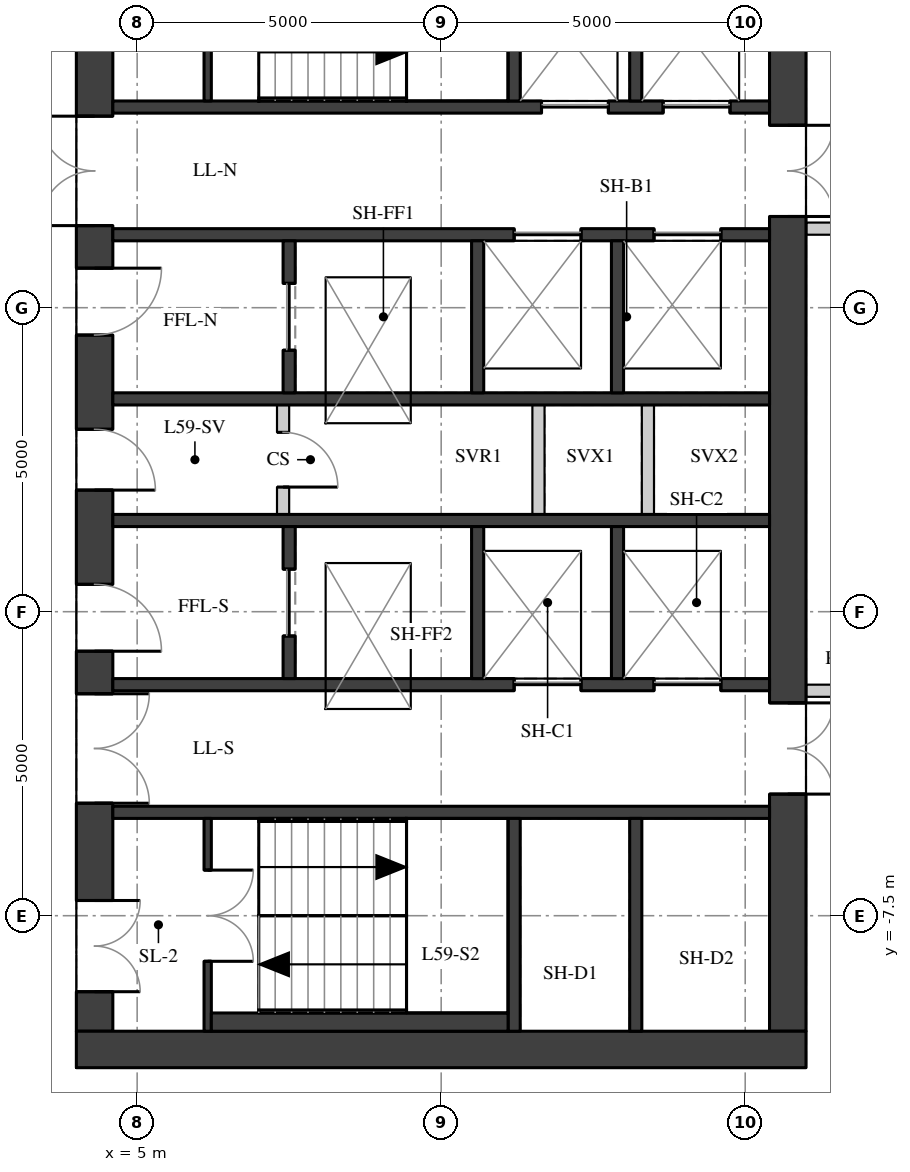
"""IFC4 building model, lengths in metres.
Left out: names, types, materials, properties, quantities, classifications, styles, units other than length and angle.
Written with IfcOpenShell. Run it as: python <this file> out.ifc"""

import sys

from ifc_helpers import new_model, si_unit, direction, frame, frame_2d, origin, place, context, subcontext, project, spatial, rectangle, extrude, element, fill, save


model = new_model("IFC4")
c1 = context("Model", 3, precision=1e-05, world=origin(), true_north=direction((0.0, 1.0)))
c2 = subcontext(c1, "Body", "Model", "MODEL_VIEW")
j1 = project(units=[si_unit("LENGTHUNIT", "METRE"), si_unit("PLANEANGLEUNIT", "RADIAN")], contexts=[c1])
p1 = place(None, origin())
s1 = spatial("IfcSite", under=j1, at=p1, CompositionType="ELEMENT")
p2 = place(p1, origin())
s2 = spatial("IfcBuilding", under=s1, at=p2, CompositionType="ELEMENT")
p3 = place(p2, frame((0.0, 0.0, 209.0)))
s3 = spatial("IfcBuildingStorey", under=s2, at=p3, CompositionType="ELEMENT", Elevation=209.0)
p4 = place(p3, frame((4.3, -9.4, 0.0), z_axis=(0.0, 0.0, 1.0), x_axis=(0.0, 1.0, 0.0)))
e1 = element("IfcWall", 1, at=p4, inside=s3, PredefinedType="SHEAR", context=c2, shape_type="SweptSolid", body=[
    extrude(rectangle(XDim=18.8, YDim=0.6, at=frame_2d((9.4, 0.0))), origin(), (0.0, 0.0, 1.0), 3.02),
])
p5 = place(p4, frame((0.65, 0.0, 0.0)))
e2 = element("IfcOpeningElement", 2, at=p5, cuts=e1, PredefinedType="OPENING", context=c2, shape_type="SweptSolid", body=[
    extrude(rectangle(XDim=1.5, YDim=2.1, at=frame_2d((0.75, 1.05))), frame((0.0, 0.31, 0.0), z_axis=(0.0, -1.0, 0.0), x_axis=(1.0, 0.0, 0.0)), (0.0, 0.0, 1.0), 0.62),
])
p6 = place(p4, frame((3.75, 0.0, 0.0)))
e3 = element("IfcOpeningElement", 3, at=p6, cuts=e1, PredefinedType="OPENING", context=c2, shape_type="SweptSolid", body=[
    extrude(rectangle(XDim=1.8, YDim=2.1, at=frame_2d((0.9, 1.05))), frame((0.0, 0.31, 0.0), z_axis=(0.0, -1.0, 0.0), x_axis=(1.0, 0.0, 0.0)), (0.0, 0.0, 1.0), 0.62),
])
p7 = place(p4, frame((6.25, 0.0, 0.0)))
e4 = element("IfcOpeningElement", 4, at=p7, cuts=e1, PredefinedType="OPENING", context=c2, shape_type="SweptSolid", body=[
    extrude(rectangle(XDim=1.1, YDim=2.1, at=frame_2d((0.55, 1.05))), frame((0.0, 0.31, 0.0), z_axis=(0.0, -1.0, 0.0), x_axis=(1.0, 0.0, 0.0)), (0.0, 0.0, 1.0), 0.62),
])
p8 = place(p4, frame((8.9, 0.0, 0.0)))
e5 = element("IfcOpeningElement", 5, at=p8, cuts=e1, PredefinedType="OPENING", context=c2, shape_type="SweptSolid", body=[
    extrude(rectangle(XDim=1.0, YDim=2.1, at=frame_2d((0.5, 1.05))), frame((0.0, 0.31, 0.0), z_axis=(0.0, -1.0, 0.0), x_axis=(1.0, 0.0, 0.0)), (0.0, 0.0, 1.0), 0.62),
])
p9 = place(p4, frame((11.45, 0.0, 0.0)))
e6 = element("IfcOpeningElement", 6, at=p9, cuts=e1, PredefinedType="OPENING", context=c2, shape_type="SweptSolid", body=[
    extrude(rectangle(XDim=1.1, YDim=2.1, at=frame_2d((0.55, 1.05))), frame((0.0, 0.31, 0.0), z_axis=(0.0, -1.0, 0.0), x_axis=(1.0, 0.0, 0.0)), (0.0, 0.0, 1.0), 0.62),
])
p10 = place(p4, frame((13.25, 0.0, 0.0)))
e7 = element("IfcOpeningElement", 7, at=p10, cuts=e1, PredefinedType="OPENING", context=c2, shape_type="SweptSolid", body=[
    extrude(rectangle(XDim=1.8, YDim=2.1, at=frame_2d((0.9, 1.05))), frame((0.0, 0.31, 0.0), z_axis=(0.0, -1.0, 0.0), x_axis=(1.0, 0.0, 0.0)), (0.0, 0.0, 1.0), 0.62),
])
p11 = place(p4, frame((16.65, 0.0, 0.0)))
e8 = element("IfcOpeningElement", 8, at=p11, cuts=e1, PredefinedType="OPENING", context=c2, shape_type="SweptSolid", body=[
    extrude(rectangle(XDim=1.5, YDim=2.1, at=frame_2d((0.75, 1.05))), frame((0.0, 0.31, 0.0), z_axis=(0.0, -1.0, 0.0), x_axis=(1.0, 0.0, 0.0)), (0.0, 0.0, 1.0), 0.62),
])
p12 = place(p3, frame((15.7, -9.4, 0.0), z_axis=(0.0, 0.0, 1.0), x_axis=(0.0, 1.0, 0.0)))
e9 = element("IfcWall", 9, at=p12, inside=s3, PredefinedType="SHEAR", context=c2, shape_type="SweptSolid", body=[
    extrude(rectangle(XDim=18.8, YDim=0.6, at=frame_2d((9.4, 0.0))), origin(), (0.0, 0.0, 1.0), 3.02),
])
p13 = place(p12, frame((13.4, 0.0, 0.0)))
e10 = element("IfcOpeningElement", 10, at=p13, cuts=e9, PredefinedType="OPENING", context=c2, shape_type="SweptSolid", body=[
    extrude(rectangle(XDim=1.5, YDim=2.1, at=frame_2d((0.75, 1.05))), frame((0.0, 0.31, 0.0), z_axis=(0.0, -1.0, 0.0), x_axis=(1.0, 0.0, 0.0)), (0.0, 0.0, 1.0), 0.62),
])
p14 = place(p12, frame((3.9, 0.0, 0.0)))
e11 = element("IfcOpeningElement", 11, at=p14, cuts=e9, PredefinedType="OPENING", context=c2, shape_type="SweptSolid", body=[
    extrude(rectangle(XDim=1.5, YDim=2.1, at=frame_2d((0.75, 1.05))), frame((0.0, 0.31, 0.0), z_axis=(0.0, -1.0, 0.0), x_axis=(1.0, 0.0, 0.0)), (0.0, 0.0, 1.0), 0.62),
])
p15 = place(p3, frame((4.0, -9.7, 0.0), z_axis=(0.0, 0.0, 1.0), x_axis=(1.0, 0.0, 0.0)))
e12 = element("IfcWall", 12, at=p15, inside=s3, PredefinedType="SHEAR", context=c2, shape_type="SweptSolid", body=[
    extrude(rectangle(XDim=12.0, YDim=0.6, at=frame_2d((6.0, 0.0))), origin(), (0.0, 0.0, 1.0), 3.02),
])
p16 = place(p3, frame((4.6, 5.8, 0.0), z_axis=(0.0, 0.0, 1.0), x_axis=(1.0, 0.0, 0.0)))
e13 = element("IfcWall", 13, at=p16, inside=s3, PredefinedType="SHEAR", context=c2, shape_type="SweptSolid", body=[
    extrude(rectangle(XDim=10.8, YDim=0.2, at=frame_2d((5.4, 0.0))), origin(), (0.0, 0.0, 1.0), 3.02),
])
p17 = place(p16, frame((7.05, 0.0, 0.0)))
e14 = element("IfcOpeningElement", 14, at=p17, cuts=e13, PredefinedType="OPENING", context=c2, shape_type="SweptSolid", body=[
    extrude(rectangle(XDim=1.1, YDim=2.1, at=frame_2d((0.55, 1.05))), frame((0.0, 0.11, 0.0), z_axis=(0.0, -1.0, 0.0), x_axis=(1.0, 0.0, 0.0)), (0.0, 0.0, 1.0), 0.22),
])
p18 = place(p16, frame((9.05, 0.0, 0.0)))
e15 = element("IfcOpeningElement", 15, at=p18, cuts=e13, PredefinedType="OPENING", context=c2, shape_type="SweptSolid", body=[
    extrude(rectangle(XDim=1.1, YDim=2.1, at=frame_2d((0.55, 1.05))), frame((0.0, 0.11, 0.0), z_axis=(0.0, -1.0, 0.0), x_axis=(1.0, 0.0, 0.0)), (0.0, 0.0, 1.0), 0.22),
])
p19 = place(p3, frame((4.6, 3.7, 0.0), z_axis=(0.0, 0.0, 1.0), x_axis=(1.0, 0.0, 0.0)))
e16 = element("IfcWall", 16, at=p19, inside=s3, PredefinedType="SHEAR", context=c2, shape_type="SweptSolid", body=[
    extrude(rectangle(XDim=10.8, YDim=0.2, at=frame_2d((5.4, 0.0))), origin(), (0.0, 0.0, 1.0), 3.02),
])
p20 = place(p19, frame((6.6, 0.0, 0.0)))
e17 = element("IfcOpeningElement", 17, at=p20, cuts=e16, PredefinedType="OPENING", context=c2, shape_type="SweptSolid", body=[
    extrude(rectangle(XDim=1.1, YDim=2.1, at=frame_2d((0.55, 1.05))), frame((0.0, 0.11, 0.0), z_axis=(0.0, -1.0, 0.0), x_axis=(1.0, 0.0, 0.0)), (0.0, 0.0, 1.0), 0.22),
])
p21 = place(p19, frame((8.9, 0.0, 0.0)))
e18 = element("IfcOpeningElement", 18, at=p21, cuts=e16, PredefinedType="OPENING", context=c2, shape_type="SweptSolid", body=[
    extrude(rectangle(XDim=1.1, YDim=2.1, at=frame_2d((0.55, 1.05))), frame((0.0, 0.11, 0.0), z_axis=(0.0, -1.0, 0.0), x_axis=(1.0, 0.0, 0.0)), (0.0, 0.0, 1.0), 0.22),
])
for number, where, z_axis, x_axis in (
    (19, (4.6, 1.0, 0.0), (0.0, 0.0, 1.0), (1.0, 0.0, 0.0)),
    (20, (4.6, -1.0, 0.0), (0.0, 0.0, 1.0), (1.0, 0.0, 0.0)),
):
    element("IfcWall", number, at=place(p3, frame(where, z_axis=z_axis, x_axis=x_axis)), inside=s3, PredefinedType="SHEAR", context=c2, shape_type="SweptSolid", body=[
        extrude(rectangle(XDim=10.8, YDim=0.2, at=frame_2d((5.4, 0.0))), origin(), (0.0, 0.0, 1.0), 3.02),
    ])
p22 = place(p3, frame((4.6, -3.7, 0.0), z_axis=(0.0, 0.0, 1.0), x_axis=(1.0, 0.0, 0.0)))
e21 = element("IfcWall", 21, at=p22, inside=s3, PredefinedType="SHEAR", context=c2, shape_type="SweptSolid", body=[
    extrude(rectangle(XDim=10.8, YDim=0.2, at=frame_2d((5.4, 0.0))), origin(), (0.0, 0.0, 1.0), 3.02),
])
p23 = place(p22, frame((6.6, 0.0, 0.0)))
e22 = element("IfcOpeningElement", 22, at=p23, cuts=e21, PredefinedType="OPENING", context=c2, shape_type="SweptSolid", body=[
    extrude(rectangle(XDim=1.1, YDim=2.1, at=frame_2d((0.55, 1.05))), frame((0.0, 0.11, 0.0), z_axis=(0.0, -1.0, 0.0), x_axis=(1.0, 0.0, 0.0)), (0.0, 0.0, 1.0), 0.22),
])
p24 = place(p22, frame((8.9, 0.0, 0.0)))
e23 = element("IfcOpeningElement", 23, at=p24, cuts=e21, PredefinedType="OPENING", context=c2, shape_type="SweptSolid", body=[
    extrude(rectangle(XDim=1.1, YDim=2.1, at=frame_2d((0.55, 1.05))), frame((0.0, 0.11, 0.0), z_axis=(0.0, -1.0, 0.0), x_axis=(1.0, 0.0, 0.0)), (0.0, 0.0, 1.0), 0.22),
])
p25 = place(p3, frame((4.6, -5.8, 0.0), z_axis=(0.0, 0.0, 1.0), x_axis=(1.0, 0.0, 0.0)))
e24 = element("IfcWall", 24, at=p25, inside=s3, PredefinedType="SHEAR", context=c2, shape_type="SweptSolid", body=[
    extrude(rectangle(XDim=10.8, YDim=0.2, at=frame_2d((5.4, 0.0))), origin(), (0.0, 0.0, 1.0), 3.02),
])
for number, where, z_axis, x_axis in (
    (25, (11.2, 5.9, 0.0), (0.0, 0.0, 1.0), (0.0, 1.0, 0.0)),
    (26, (11.2, -9.4, 0.0), (0.0, 0.0, 1.0), (0.0, 1.0, 0.0)),
    (27, (13.2, 5.9, 0.0), (0.0, 0.0, 1.0), (0.0, 1.0, 0.0)),
    (28, (13.2, -9.4, 0.0), (0.0, 0.0, 1.0), (0.0, 1.0, 0.0)),
):
    element("IfcWall", number, at=place(p3, frame(where, z_axis=z_axis, x_axis=x_axis)), inside=s3, PredefinedType="SHEAR", context=c2, shape_type="SweptSolid", body=[
        extrude(rectangle(XDim=3.5, YDim=0.2, at=frame_2d((1.75, 0.0))), origin(), (0.0, 0.0, 1.0), 3.02),
    ])
p26 = place(p3, frame((7.5, 1.1, 0.0), z_axis=(0.0, 0.0, 1.0), x_axis=(0.0, 1.0, 0.0)))
e29 = element("IfcWall", 29, at=p26, inside=s3, PredefinedType="SHEAR", context=c2, shape_type="SweptSolid", body=[
    extrude(rectangle(XDim=2.5, YDim=0.2, at=frame_2d((1.25, 0.0))), origin(), (0.0, 0.0, 1.0), 3.02),
])
p27 = place(p26, frame((0.7, 0.0, 0.0)))
e30 = element("IfcOpeningElement", 30, at=p27, cuts=e29, PredefinedType="OPENING", context=c2, shape_type="SweptSolid", body=[
    extrude(rectangle(XDim=1.1, YDim=2.1, at=frame_2d((0.55, 1.05))), frame((0.0, 0.11, 0.0), z_axis=(0.0, -1.0, 0.0), x_axis=(1.0, 0.0, 0.0)), (0.0, 0.0, 1.0), 0.22),
])
p28 = place(p3, frame((7.5, -3.6, 0.0), z_axis=(0.0, 0.0, 1.0), x_axis=(0.0, 1.0, 0.0)))
e31 = element("IfcWall", 31, at=p28, inside=s3, PredefinedType="SHEAR", context=c2, shape_type="SweptSolid", body=[
    extrude(rectangle(XDim=2.5, YDim=0.2, at=frame_2d((1.25, 0.0))), origin(), (0.0, 0.0, 1.0), 3.02),
])
p29 = place(p28, frame((0.7, 0.0, 0.0)))
e32 = element("IfcOpeningElement", 32, at=p29, cuts=e31, PredefinedType="OPENING", context=c2, shape_type="SweptSolid", body=[
    extrude(rectangle(XDim=1.1, YDim=2.1, at=frame_2d((0.55, 1.05))), frame((0.0, 0.11, 0.0), z_axis=(0.0, -1.0, 0.0), x_axis=(1.0, 0.0, 0.0)), (0.0, 0.0, 1.0), 0.22),
])
for number, where, z_axis, x_axis in (
    (33, (10.6, 1.1, 0.0), (0.0, 0.0, 1.0), (0.0, 1.0, 0.0)),
    (34, (10.6, -3.6, 0.0), (0.0, 0.0, 1.0), (0.0, 1.0, 0.0)),
    (35, (12.9, 1.1, 0.0), (0.0, 0.0, 1.0), (0.0, 1.0, 0.0)),
    (36, (12.9, -3.6, 0.0), (0.0, 0.0, 1.0), (0.0, 1.0, 0.0)),
):
    element("IfcWall", number, at=place(p3, frame(where, z_axis=z_axis, x_axis=x_axis)), inside=s3, PredefinedType="SHEAR", context=c2, shape_type="SweptSolid", body=[
        extrude(rectangle(XDim=2.5, YDim=0.2, at=frame_2d((1.25, 0.0))), origin(), (0.0, 0.0, 1.0), 3.02),
    ])
p30 = place(p3, frame((6.16, 5.9, 0.0), z_axis=(0.0, 0.0, 1.0), x_axis=(0.0, 1.0, 0.0)))
e37 = element("IfcWall", 37, at=p30, inside=s3, PredefinedType="SHEAR", context=c2, shape_type="SweptSolid", body=[
    extrude(rectangle(XDim=3.5, YDim=0.12, at=frame_2d((1.75, 0.0))), origin(), (0.0, 0.0, 1.0), 3.02),
])
p31 = place(p30, frame((0.85, 0.0, 0.0)))
e38 = element("IfcOpeningElement", 38, at=p31, cuts=e37, PredefinedType="OPENING", context=c2, shape_type="SweptSolid", body=[
    extrude(rectangle(XDim=1.5, YDim=2.1, at=frame_2d((0.75, 1.05))), frame((0.0, 0.07, 0.0), z_axis=(0.0, -1.0, 0.0), x_axis=(1.0, 0.0, 0.0)), (0.0, 0.0, 1.0), 0.14),
])
p32 = place(p3, frame((6.16, -9.4, 0.0), z_axis=(0.0, 0.0, 1.0), x_axis=(0.0, 1.0, 0.0)))
e39 = element("IfcWall", 39, at=p32, inside=s3, PredefinedType="SHEAR", context=c2, shape_type="SweptSolid", body=[
    extrude(rectangle(XDim=3.5, YDim=0.12, at=frame_2d((1.75, 0.0))), origin(), (0.0, 0.0, 1.0), 3.02),
])
p33 = place(p32, frame((1.15, 0.0, 0.0)))
e40 = element("IfcOpeningElement", 40, at=p33, cuts=e39, PredefinedType="OPENING", context=c2, shape_type="SweptSolid", body=[
    extrude(rectangle(XDim=1.5, YDim=2.1, at=frame_2d((0.75, 1.05))), frame((0.0, 0.07, 0.0), z_axis=(0.0, -1.0, 0.0), x_axis=(1.0, 0.0, 0.0)), (0.0, 0.0, 1.0), 0.14),
])
p34 = place(p3, frame((7.4, -0.9, 0.0), z_axis=(0.0, 0.0, 1.0), x_axis=(0.0, 1.0, 0.0)))
e41 = element("IfcWall", 41, at=p34, inside=s3, PredefinedType="PARTITIONING", context=c2, shape_type="SweptSolid", body=[
    extrude(rectangle(XDim=1.8, YDim=0.2, at=frame_2d((0.9, 0.0))), origin(), (0.0, 0.0, 1.0), 3.02),
])
p35 = place(p34, frame((0.45, 0.0, 0.0)))
e42 = element("IfcOpeningElement", 42, at=p35, cuts=e41, PredefinedType="OPENING", context=c2, shape_type="SweptSolid", body=[
    extrude(rectangle(XDim=0.9, YDim=2.1, at=frame_2d((0.45, 1.05))), frame((0.0, 0.11, 0.0), z_axis=(0.0, -1.0, 0.0), x_axis=(1.0, 0.0, 0.0)), (0.0, 0.0, 1.0), 0.22),
])
for number, where, z_axis, x_axis in (
    (43, (11.6, -0.9, 0.0), (0.0, 0.0, 1.0), (0.0, 1.0, 0.0)),
    (44, (13.4, -0.9, 0.0), (0.0, 0.0, 1.0), (0.0, 1.0, 0.0)),
):
    element("IfcWall", number, at=place(p3, frame(where, z_axis=z_axis, x_axis=x_axis)), inside=s3, PredefinedType="PARTITIONING", context=c2, shape_type="SweptSolid", body=[
        extrude(rectangle(XDim=1.8, YDim=0.2, at=frame_2d((0.9, 0.0))), origin(), (0.0, 0.0, 1.0), 3.02),
    ])
p36 = place(p3, frame((6.22, -9.25, 0.0), z_axis=(0.0, 0.0, 1.0), x_axis=(1.0, 0.0, 0.0)))
e45 = element("IfcWall", 45, at=p36, inside=s3, PredefinedType="PARTITIONING", context=c2, shape_type="SweptSolid", body=[
    extrude(rectangle(XDim=4.88, YDim=0.3, at=frame_2d((2.44, 0.0))), origin(), (0.0, 0.0, 1.0), 3.02),
])
p37 = place(p3, frame((17.5, 3.8, 0.0), z_axis=(0.0, 0.0, 1.0), x_axis=(-1.0, 0.0, 0.0)))
e46 = element("IfcWall", 46, at=p37, inside=s3, PredefinedType="PARTITIONING", context=c2, shape_type="SweptSolid", body=[
    extrude(rectangle(XDim=1.496, YDim=0.2, at=frame_2d((0.748, 0.0))), origin(), (0.0, 0.0, 1.0), 3.02),
])
p38 = place(p3, frame((16.004, -3.8, 0.0), z_axis=(0.0, 0.0, 1.0), x_axis=(1.0, 0.0, 0.0)))
e47 = element("IfcWall", 47, at=p38, inside=s3, PredefinedType="PARTITIONING", context=c2, shape_type="SweptSolid", body=[
    extrude(rectangle(XDim=1.496, YDim=0.2, at=frame_2d((0.748, 0.0))), origin(), (0.0, 0.0, 1.0), 2.47),
])
p39 = place(p5, origin())
e48 = element("IfcDoor", 48, at=p39, inside=s3, OperationType="DOUBLE_DOOR_SINGLE_SWING", PredefinedType="DOOR", context=c2, shape_type="SweptSolid", body=[
    extrude(rectangle(XDim=1.5, YDim=2.1, at=frame_2d((0.75, 1.05))), frame((0.0, 0.025, 0.0), z_axis=(0.0, -1.0, 0.0), x_axis=(1.0, 0.0, 0.0)), (0.0, 0.0, 1.0), 0.05),
])
fill(e2, e48)
p40 = place(p6, origin())
e49 = element("IfcDoor", 49, at=p40, inside=s3, OperationType="DOUBLE_DOOR_SINGLE_SWING", PredefinedType="DOOR", context=c2, shape_type="SweptSolid", body=[
    extrude(rectangle(XDim=1.8, YDim=2.1, at=frame_2d((0.9, 1.05))), frame((0.0, 0.025, 0.0), z_axis=(0.0, -1.0, 0.0), x_axis=(1.0, 0.0, 0.0)), (0.0, 0.0, 1.0), 0.05),
])
fill(e3, e49)
p41 = place(p7, origin())
e50 = element("IfcDoor", 50, at=p41, inside=s3, OperationType="SINGLE_SWING_RIGHT", PredefinedType="DOOR", context=c2, shape_type="SweptSolid", body=[
    extrude(rectangle(XDim=1.1, YDim=2.1, at=frame_2d((0.55, 1.05))), frame((0.0, 0.025, 0.0), z_axis=(0.0, -1.0, 0.0), x_axis=(1.0, 0.0, 0.0)), (0.0, 0.0, 1.0), 0.05),
])
fill(e4, e50)
p42 = place(p8, origin())
e51 = element("IfcDoor", 51, at=p42, inside=s3, OperationType="SINGLE_SWING_RIGHT", PredefinedType="DOOR", context=c2, shape_type="SweptSolid", body=[
    extrude(rectangle(XDim=1.0, YDim=2.1, at=frame_2d((0.5, 1.05))), frame((0.0, 0.025, 0.0), z_axis=(0.0, -1.0, 0.0), x_axis=(1.0, 0.0, 0.0)), (0.0, 0.0, 1.0), 0.05),
])
fill(e5, e51)
p43 = place(p9, origin())
e52 = element("IfcDoor", 52, at=p43, inside=s3, OperationType="SINGLE_SWING_LEFT", PredefinedType="DOOR", context=c2, shape_type="SweptSolid", body=[
    extrude(rectangle(XDim=1.1, YDim=2.1, at=frame_2d((0.55, 1.05))), frame((0.0, 0.025, 0.0), z_axis=(0.0, -1.0, 0.0), x_axis=(1.0, 0.0, 0.0)), (0.0, 0.0, 1.0), 0.05),
])
fill(e6, e52)
p44 = place(p10, origin())
e53 = element("IfcDoor", 53, at=p44, inside=s3, OperationType="DOUBLE_DOOR_SINGLE_SWING", PredefinedType="DOOR", context=c2, shape_type="SweptSolid", body=[
    extrude(rectangle(XDim=1.8, YDim=2.1, at=frame_2d((0.9, 1.05))), frame((0.0, 0.025, 0.0), z_axis=(0.0, -1.0, 0.0), x_axis=(1.0, 0.0, 0.0)), (0.0, 0.0, 1.0), 0.05),
])
fill(e7, e53)
p45 = place(p13, origin())
e54 = element("IfcDoor", 54, at=p45, inside=s3, OperationType="DOUBLE_DOOR_SINGLE_SWING", PredefinedType="DOOR", context=c2, shape_type="SweptSolid", body=[
    extrude(rectangle(XDim=1.5, YDim=2.1, at=frame_2d((0.75, 1.05))), frame((0.0, 0.025, 0.0), z_axis=(0.0, -1.0, 0.0), x_axis=(1.0, 0.0, 0.0)), (0.0, 0.0, 1.0), 0.05),
])
fill(e10, e54)
p46 = place(p14, origin())
e55 = element("IfcDoor", 55, at=p46, inside=s3, OperationType="DOUBLE_DOOR_SINGLE_SWING", PredefinedType="DOOR", context=c2, shape_type="SweptSolid", body=[
    extrude(rectangle(XDim=1.5, YDim=2.1, at=frame_2d((0.75, 1.05))), frame((0.0, 0.025, 0.0), z_axis=(0.0, -1.0, 0.0), x_axis=(1.0, 0.0, 0.0)), (0.0, 0.0, 1.0), 0.05),
])
fill(e11, e55)
p47 = place(p33, origin())
e56 = element("IfcDoor", 56, at=p47, inside=s3, OperationType="DOUBLE_DOOR_SINGLE_SWING", PredefinedType="DOOR", context=c2, shape_type="SweptSolid", body=[
    extrude(rectangle(XDim=1.5, YDim=2.1, at=frame_2d((0.75, 1.05))), frame((0.0, 0.025, 0.0), z_axis=(0.0, -1.0, 0.0), x_axis=(1.0, 0.0, 0.0)), (0.0, 0.0, 1.0), 0.05),
])
fill(e40, e56)
p48 = place(p17, origin())
e57 = element("IfcDoor", 57, at=p48, inside=s3, OperationType="DOUBLE_DOOR_SLIDING", PredefinedType="DOOR", context=c2, shape_type="SweptSolid", body=[
    extrude(rectangle(XDim=1.1, YDim=2.1, at=frame_2d((0.55, 1.05))), frame((0.0, 0.025, 0.0), z_axis=(0.0, -1.0, 0.0), x_axis=(1.0, 0.0, 0.0)), (0.0, 0.0, 1.0), 0.05),
])
fill(e14, e57)
p49 = place(p18, origin())
e58 = element("IfcDoor", 58, at=p49, inside=s3, OperationType="DOUBLE_DOOR_SLIDING", PredefinedType="DOOR", context=c2, shape_type="SweptSolid", body=[
    extrude(rectangle(XDim=1.1, YDim=2.1, at=frame_2d((0.55, 1.05))), frame((0.0, 0.025, 0.0), z_axis=(0.0, -1.0, 0.0), x_axis=(1.0, 0.0, 0.0)), (0.0, 0.0, 1.0), 0.05),
])
fill(e15, e58)
p50 = place(p20, origin())
e59 = element("IfcDoor", 59, at=p50, inside=s3, OperationType="DOUBLE_DOOR_SLIDING", PredefinedType="DOOR", context=c2, shape_type="SweptSolid", body=[
    extrude(rectangle(XDim=1.1, YDim=2.1, at=frame_2d((0.55, 1.05))), frame((0.0, 0.025, 0.0), z_axis=(0.0, -1.0, 0.0), x_axis=(1.0, 0.0, 0.0)), (0.0, 0.0, 1.0), 0.05),
])
fill(e17, e59)
p51 = place(p21, origin())
e60 = element("IfcDoor", 60, at=p51, inside=s3, OperationType="DOUBLE_DOOR_SLIDING", PredefinedType="DOOR", context=c2, shape_type="SweptSolid", body=[
    extrude(rectangle(XDim=1.1, YDim=2.1, at=frame_2d((0.55, 1.05))), frame((0.0, 0.025, 0.0), z_axis=(0.0, -1.0, 0.0), x_axis=(1.0, 0.0, 0.0)), (0.0, 0.0, 1.0), 0.05),
])
fill(e18, e60)
p52 = place(p23, origin())
e61 = element("IfcDoor", 61, at=p52, inside=s3, OperationType="DOUBLE_DOOR_SLIDING", PredefinedType="DOOR", context=c2, shape_type="SweptSolid", body=[
    extrude(rectangle(XDim=1.1, YDim=2.1, at=frame_2d((0.55, 1.05))), frame((0.0, 0.025, 0.0), z_axis=(0.0, -1.0, 0.0), x_axis=(1.0, 0.0, 0.0)), (0.0, 0.0, 1.0), 0.05),
])
fill(e22, e61)
p53 = place(p24, origin())
e62 = element("IfcDoor", 62, at=p53, inside=s3, OperationType="DOUBLE_DOOR_SLIDING", PredefinedType="DOOR", context=c2, shape_type="SweptSolid", body=[
    extrude(rectangle(XDim=1.1, YDim=2.1, at=frame_2d((0.55, 1.05))), frame((0.0, 0.025, 0.0), z_axis=(0.0, -1.0, 0.0), x_axis=(1.0, 0.0, 0.0)), (0.0, 0.0, 1.0), 0.05),
])
fill(e23, e62)
p54 = place(p27, origin())
e63 = element("IfcDoor", 63, at=p54, inside=s3, OperationType="DOUBLE_DOOR_SLIDING", PredefinedType="DOOR", context=c2, shape_type="SweptSolid", body=[
    extrude(rectangle(XDim=1.1, YDim=2.1, at=frame_2d((0.55, 1.05))), frame((0.0, 0.025, 0.0), z_axis=(0.0, -1.0, 0.0), x_axis=(1.0, 0.0, 0.0)), (0.0, 0.0, 1.0), 0.05),
])
fill(e30, e63)
p55 = place(p29, origin())
e64 = element("IfcDoor", 64, at=p55, inside=s3, OperationType="DOUBLE_DOOR_SLIDING", PredefinedType="DOOR", context=c2, shape_type="SweptSolid", body=[
    extrude(rectangle(XDim=1.1, YDim=2.1, at=frame_2d((0.55, 1.05))), frame((0.0, 0.025, 0.0), z_axis=(0.0, -1.0, 0.0), x_axis=(1.0, 0.0, 0.0)), (0.0, 0.0, 1.0), 0.05),
])
fill(e32, e64)
p56 = place(p35, origin())
e65 = element("IfcDoor", 65, at=p56, inside=s3, OperationType="SINGLE_SWING_RIGHT", PredefinedType="DOOR", context=c2, shape_type="SweptSolid", body=[
    extrude(rectangle(XDim=0.9, YDim=2.1, at=frame_2d((0.45, 1.05))), frame((0.0, 0.025, 0.0), z_axis=(0.0, -1.0, 0.0), x_axis=(1.0, 0.0, 0.0)), (0.0, 0.0, 1.0), 0.05),
])
fill(e42, e65)
save(model, sys.argv[1])
